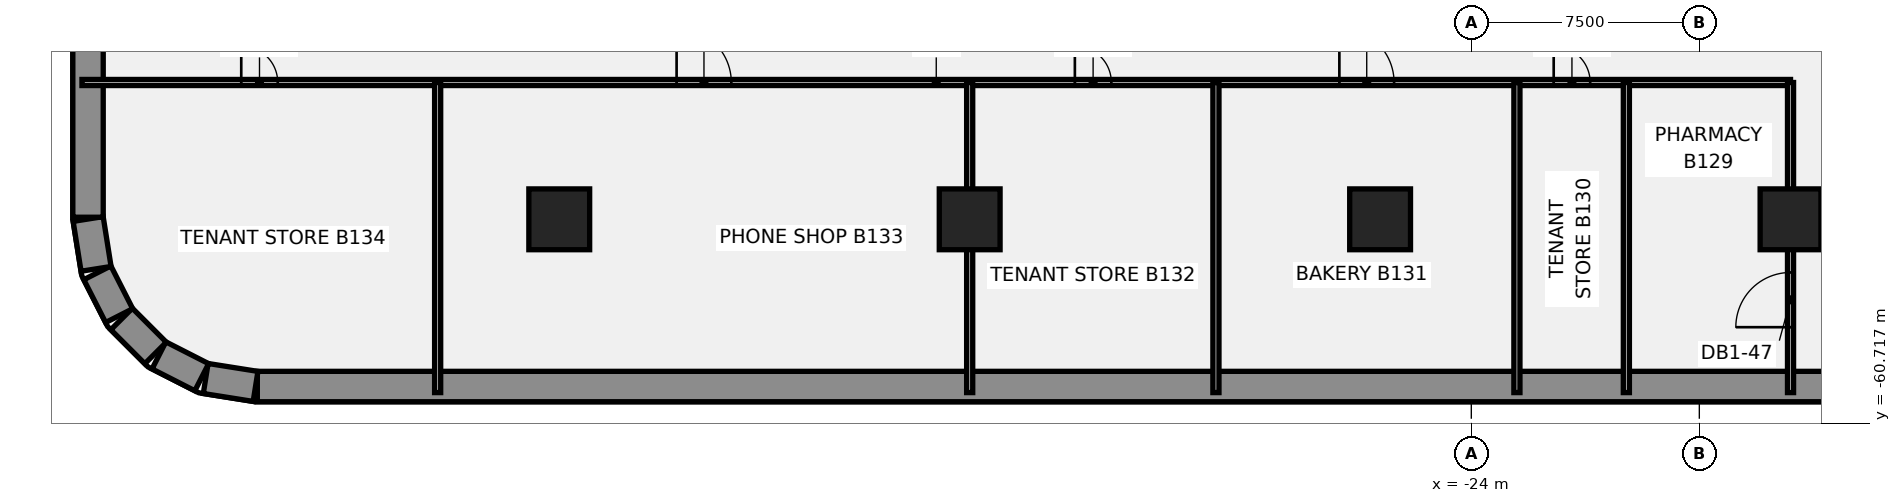
"""IFC4 building model, lengths in metres.
Left out: names, types, materials, properties, quantities, classifications, styles, units other than length and angle.
Written with IfcOpenShell. Run it as: python <this file> out.ifc"""

import sys

from ifc_helpers import new_model, si_unit, direction, frame, frame_2d, origin, origin_2d, place, context, subcontext, project, spatial, rectangle, extrude, element, fill, save


model = new_model("IFC4")
c1 = context("Model", 3, precision=1e-05, world=origin(), true_north=direction((0.0, 1.0)))
c2 = subcontext(c1, "Body", "Model", "MODEL_VIEW")
j1 = project(units=[si_unit("LENGTHUNIT", "METRE"), si_unit("PLANEANGLEUNIT", "RADIAN")], contexts=[c1])
p1 = place(None, origin())
s1 = spatial("IfcSite", under=j1, at=p1, CompositionType="ELEMENT")
p2 = place(p1, origin())
s2 = spatial("IfcBuilding", under=s1, at=p2, CompositionType="ELEMENT")
p3 = place(p2, frame((0.0, 0.0, -7.0)))
s3 = spatial("IfcBuildingStorey", under=s2, at=p3, CompositionType="ELEMENT", Elevation=-7.0)
p4 = place(p3, frame((63.931, -59.5, -0.45), z_axis=(0.0, 0.0, 1.0), x_axis=(-1.0, 0.0, 0.0)))
e1 = element("IfcWall", 1, at=p4, inside=s3, PredefinedType="SOLIDWALL", context=c2, shape_type="SweptSolid", body=[
    extrude(rectangle(XDim=127.863, YDim=1.0, at=frame_2d((63.931, 0.0))), origin(), (0.0, 0.0, 1.0), 6.9),
])
p5 = place(p3, frame((-63.99, -59.495, -0.45), z_axis=(0.0, 0.0, 1.0), x_axis=(-0.987688946427, 0.156430639922, 0.0)))
e2 = element("IfcWall", 2, at=p5, inside=s3, PredefinedType="SOLIDWALL", context=c2, shape_type="SweptSolid", body=[
    extrude(rectangle(XDim=1.661, YDim=1.0, at=frame_2d((0.83, 0.0))), origin(), (0.0, 0.0, 1.0), 6.9),
])
for number, where, z_axis, x_axis in (
    (3, (-65.759, -59.194, -0.45), (0.0, 0.0, 1.0), (-0.891, 0.454, 0.0)),
    (4, (-67.278, -58.396, -0.45), (0.0, 0.0, 1.0), (-0.707, 0.707, 0.0)),
    (5, (-68.476, -57.168, -0.45), (0.0, 0.0, 1.0), (-0.454, 0.891, 0.0)),
):
    element("IfcWall", number, at=place(p3, frame(where, z_axis=z_axis, x_axis=x_axis)), inside=s3, PredefinedType="SOLIDWALL", context=c2, shape_type="SweptSolid", body=[
        extrude(rectangle(XDim=1.581, YDim=1.0, at=frame_2d((0.791, 0.0))), origin(), (0.0, 0.0, 1.0), 6.9),
    ])
p6 = place(p3, frame((-69.236, -55.63, -0.45), z_axis=(0.0, 0.0, 1.0), x_axis=(-0.156430639922, 0.987688946427, 0.0)))
e6 = element("IfcWall", 6, at=p6, inside=s3, PredefinedType="SOLIDWALL", context=c2, shape_type="SweptSolid", body=[
    extrude(rectangle(XDim=1.661, YDim=1.0, at=frame_2d((0.83, 0.0))), origin(), (0.0, 0.0, 1.0), 6.9),
])
p7 = place(p3, frame((-69.5, -53.931, -0.45), z_axis=(0.0, 0.0, 1.0), x_axis=(0.0, 1.0, 0.0)))
e7 = element("IfcWall", 7, at=p7, inside=s3, PredefinedType="SOLIDWALL", context=c2, shape_type="SweptSolid", body=[
    extrude(rectangle(XDim=107.863, YDim=1.0, at=frame_2d((53.931, 0.0))), origin(), (0.0, 0.0, 1.0), 6.9),
])
for number, where, z_axis, x_axis in (
    (8, (-54.0, -54.0, -0.45), (0.0, 0.0, 1.0), (1.0, 0.0, 0.0)),
    (9, (-40.5, -54.0, -0.45), (0.0, 0.0, 1.0), (1.0, 0.0, 0.0)),
    (10, (-27.0, -54.0, -0.45), (0.0, 0.0, 1.0), (1.0, 0.0, 0.0)),
    (11, (-13.5, -54.0, -0.45), (0.0, 0.0, 1.0), (1.0, 0.0, 0.0)),
):
    element("IfcColumn", number, at=place(p3, frame(where, z_axis=z_axis, x_axis=x_axis)), inside=s3, PredefinedType="COLUMN", context=c2, shape_type="SweptSolid", body=[
        extrude(rectangle(XDim=2.0, YDim=2.0, at=origin_2d()), origin(), (0.0, 0.0, 1.0), 6.9),
    ])
p8 = place(p3, frame((-69.699, -49.5, 0.0), z_axis=(0.0, 0.0, 1.0), x_axis=(1.0, 0.0, 0.0)))
e12 = element("IfcWall", 12, at=p8, inside=s3, PredefinedType="PARTITIONING", context=c2, shape_type="SweptSolid", body=[
    extrude(rectangle(XDim=56.199, YDim=0.2, at=frame_2d((28.1, 0.0))), origin(), (0.0, 0.0, 1.0), 6.45),
])
p9 = place(p8, frame((48.409, 0.0, 0.0)))
e13 = element("IfcOpeningElement", 13, at=p9, cuts=e12, PredefinedType="OPENING", context=c2, shape_type="SweptSolid", body=[
    extrude(rectangle(XDim=1.2, YDim=2.1, at=frame_2d((0.6, 1.05))), frame((0.0, 0.11, 0.0), z_axis=(0.0, -1.0, 0.0), x_axis=(1.0, 0.0, 0.0)), (0.0, 0.0, 1.0), 0.22),
])
p10 = place(p8, frame((41.359, 0.0, 0.0)))
e14 = element("IfcOpeningElement", 14, at=p10, cuts=e12, PredefinedType="OPENING", context=c2, shape_type="SweptSolid", body=[
    extrude(rectangle(XDim=1.8, YDim=2.1, at=frame_2d((0.9, 1.05))), frame((0.0, 0.11, 0.0), z_axis=(0.0, -1.0, 0.0), x_axis=(1.0, 0.0, 0.0)), (0.0, 0.0, 1.0), 0.22),
])
p11 = place(p8, frame((32.659, 0.0, 0.0)))
e15 = element("IfcOpeningElement", 15, at=p11, cuts=e12, PredefinedType="OPENING", context=c2, shape_type="SweptSolid", body=[
    extrude(rectangle(XDim=1.2, YDim=2.1, at=frame_2d((0.6, 1.05))), frame((0.0, 0.11, 0.0), z_axis=(0.0, -1.0, 0.0), x_axis=(1.0, 0.0, 0.0)), (0.0, 0.0, 1.0), 0.22),
])
p12 = place(p8, frame((19.559, 0.0, 0.0)))
e16 = element("IfcOpeningElement", 16, at=p12, cuts=e12, PredefinedType="OPENING", context=c2, shape_type="SweptSolid", body=[
    extrude(rectangle(XDim=1.8, YDim=2.1, at=frame_2d((0.9, 1.05))), frame((0.0, 0.11, 0.0), z_axis=(0.0, -1.0, 0.0), x_axis=(1.0, 0.0, 0.0)), (0.0, 0.0, 1.0), 0.22),
])
p13 = place(p8, frame((5.239, 0.0, 0.0)))
e17 = element("IfcOpeningElement", 17, at=p13, cuts=e12, PredefinedType="OPENING", context=c2, shape_type="SweptSolid", body=[
    extrude(rectangle(XDim=1.2, YDim=2.1, at=frame_2d((0.6, 1.05))), frame((0.0, 0.11, 0.0), z_axis=(0.0, -1.0, 0.0), x_axis=(1.0, 0.0, 0.0)), (0.0, 0.0, 1.0), 0.22),
])
for number, where, z_axis, x_axis in (
    (18, (-58.0, -59.699, 0.0), (0.0, 0.0, 1.0), (0.0, 1.0, 0.0)),
    (19, (-40.5, -59.699, 0.0), (0.0, 0.0, 1.0), (0.0, 1.0, 0.0)),
    (20, (-32.4, -59.699, 0.0), (0.0, 0.0, 1.0), (0.0, 1.0, 0.0)),
    (21, (-22.5, -59.699, 0.0), (0.0, 0.0, 1.0), (0.0, 1.0, 0.0)),
    (22, (-18.9, -59.699, 0.0), (0.0, 0.0, 1.0), (0.0, 1.0, 0.0)),
):
    element("IfcWall", number, at=place(p3, frame(where, z_axis=z_axis, x_axis=x_axis)), inside=s3, PredefinedType="PARTITIONING", context=c2, shape_type="SweptSolid", body=[
        extrude(rectangle(XDim=10.199, YDim=0.2, at=frame_2d((5.1, 0.0))), origin(), (0.0, 0.0, 1.0), 6.45),
    ])
p14 = place(p3, frame((-13.5, -59.699, 0.0), z_axis=(0.0, 0.0, 1.0), x_axis=(0.0, 1.0, 0.0)))
e23 = element("IfcWall", 23, at=p14, inside=s3, PredefinedType="PARTITIONING", context=c2, shape_type="SweptSolid", body=[
    extrude(rectangle(XDim=10.199, YDim=0.2, at=frame_2d((5.1, 0.0))), origin(), (0.0, 0.0, 1.0), 6.45),
])
p15 = place(p14, frame((2.151, 0.0, 0.0)))
e24 = element("IfcOpeningElement", 24, at=p15, cuts=e23, PredefinedType="OPENING", context=c2, shape_type="SweptSolid", body=[
    extrude(rectangle(XDim=1.8, YDim=2.1, at=frame_2d((0.9, 1.05))), frame((0.0, 0.11, 0.0), z_axis=(0.0, -1.0, 0.0), x_axis=(1.0, 0.0, 0.0)), (0.0, 0.0, 1.0), 0.22),
])
p16 = place(p15, origin())
e25 = element("IfcDoor", 25, at=p16, inside=s3, OperationType="SINGLE_SWING_LEFT", PredefinedType="DOOR", context=c2, shape_type="SweptSolid", body=[
    extrude(rectangle(XDim=1.8, YDim=2.1, at=frame_2d((0.9, 1.05))), frame((0.0, 0.025, 0.0), z_axis=(0.0, -1.0, 0.0), x_axis=(1.0, 0.0, 0.0)), (0.0, 0.0, 1.0), 0.05),
])
fill(e24, e25)
p17 = place(p9, origin())
e26 = element("IfcDoor", 26, at=p17, inside=s3, OperationType="SINGLE_SWING_RIGHT", PredefinedType="DOOR", context=c2, shape_type="SweptSolid", body=[
    extrude(rectangle(XDim=1.2, YDim=2.1, at=frame_2d((0.6, 1.05))), frame((0.0, 0.025, 0.0), z_axis=(0.0, -1.0, 0.0), x_axis=(1.0, 0.0, 0.0)), (0.0, 0.0, 1.0), 0.05),
])
fill(e13, e26)
p18 = place(p10, origin())
e27 = element("IfcDoor", 27, at=p18, inside=s3, OperationType="SINGLE_SWING_LEFT", PredefinedType="DOOR", context=c2, shape_type="SweptSolid", body=[
    extrude(rectangle(XDim=1.8, YDim=2.1, at=frame_2d((0.9, 1.05))), frame((0.0, 0.025, 0.0), z_axis=(0.0, -1.0, 0.0), x_axis=(1.0, 0.0, 0.0)), (0.0, 0.0, 1.0), 0.05),
])
fill(e14, e27)
p19 = place(p11, origin())
e28 = element("IfcDoor", 28, at=p19, inside=s3, OperationType="SINGLE_SWING_RIGHT", PredefinedType="DOOR", context=c2, shape_type="SweptSolid", body=[
    extrude(rectangle(XDim=1.2, YDim=2.1, at=frame_2d((0.6, 1.05))), frame((0.0, 0.025, 0.0), z_axis=(0.0, -1.0, 0.0), x_axis=(1.0, 0.0, 0.0)), (0.0, 0.0, 1.0), 0.05),
])
fill(e15, e28)
p20 = place(p12, origin())
e29 = element("IfcDoor", 29, at=p20, inside=s3, OperationType="SINGLE_SWING_LEFT", PredefinedType="DOOR", context=c2, shape_type="SweptSolid", body=[
    extrude(rectangle(XDim=1.8, YDim=2.1, at=frame_2d((0.9, 1.05))), frame((0.0, 0.025, 0.0), z_axis=(0.0, -1.0, 0.0), x_axis=(1.0, 0.0, 0.0)), (0.0, 0.0, 1.0), 0.05),
])
fill(e16, e29)
p21 = place(p13, origin())
e30 = element("IfcDoor", 30, at=p21, inside=s3, OperationType="SINGLE_SWING_RIGHT", PredefinedType="DOOR", context=c2, shape_type="SweptSolid", body=[
    extrude(rectangle(XDim=1.2, YDim=2.1, at=frame_2d((0.6, 1.05))), frame((0.0, 0.025, 0.0), z_axis=(0.0, -1.0, 0.0), x_axis=(1.0, 0.0, 0.0)), (0.0, 0.0, 1.0), 0.05),
])
fill(e17, e30)
save(model, sys.argv[1])
